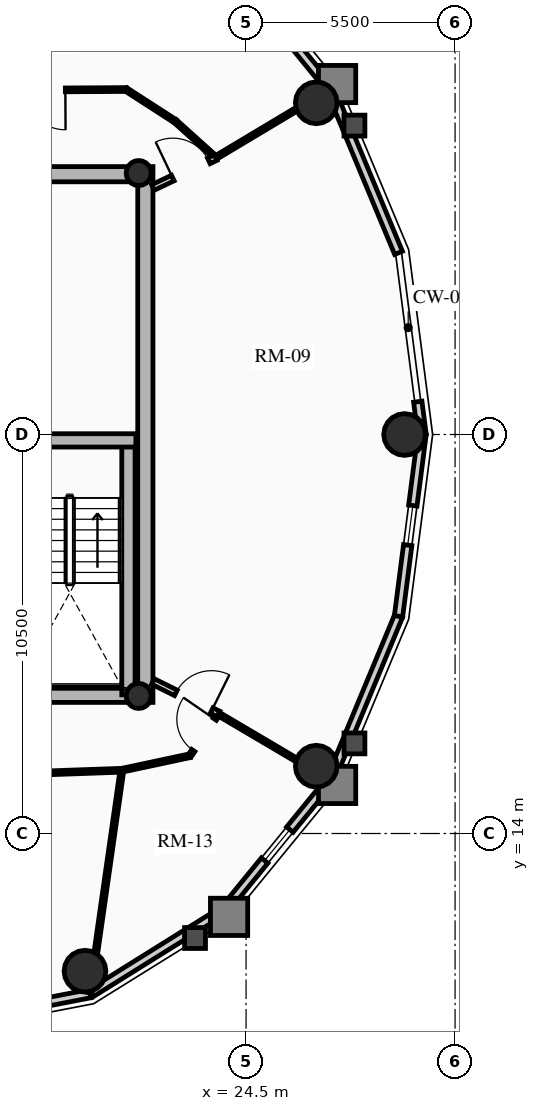
"""IFC4 building model, lengths in metres.
Left out: names, types, materials, properties, quantities, classifications, styles, units other than length and angle.
Written with IfcOpenShell. Run it as: python <this file> out.ifc"""

import sys

from ifc_helpers import new_model, si_unit, direction, frame, frame_2d, origin, origin_2d, place, context, subcontext, project, spatial, rectangle, circle, hollow_circle, extrude, source, transform, mapped, element, fill, save


model = new_model("IFC4")
c1 = context("Model", 3, precision=1e-05, world=origin(), true_north=direction((0.0, 1.0)))
c2 = subcontext(c1, "Body", "Model", "MODEL_VIEW")
j1 = project(units=[si_unit("LENGTHUNIT", "METRE"), si_unit("PLANEANGLEUNIT", "RADIAN")], contexts=[c1])
p1 = place(None, origin())
s1 = spatial("IfcSite", under=j1, at=p1, CompositionType="ELEMENT")
p2 = place(p1, origin())
s2 = spatial("IfcBuilding", under=s1, at=p2, CompositionType="ELEMENT")
p3 = place(p2, frame((0.0, 0.0, 196.66)))
s3 = spatial("IfcBuildingStorey", under=s2, at=p3, CompositionType="ELEMENT", Elevation=196.66)
p4 = place(p3, frame((21.85, 17.45, 0.0), z_axis=(0.0, 0.0, 1.0), x_axis=(0.0, 1.0, 0.0)))
e1 = element("IfcWall", 1, at=p4, inside=s3, PredefinedType="SHEAR", context=c2, shape_type="SweptSolid", body=[
    extrude(rectangle(XDim=14.1, YDim=0.4, at=frame_2d((7.05, 0.0))), origin(), (0.0, 0.0, 1.0), 2.91),
])
p5 = place(p3, frame((11.15, 17.65, 0.0), z_axis=(0.0, 0.0, 1.0), x_axis=(1.0, 0.0, 0.0)))
e2 = element("IfcWall", 2, at=p5, inside=s3, PredefinedType="SHEAR", context=c2, shape_type="SweptSolid", body=[
    extrude(rectangle(XDim=10.7, YDim=0.4, at=frame_2d((5.35, 0.0))), origin(), (0.0, 0.0, 1.0), 2.91),
])
m1 = source(origin(), c2, "Body", "SweptSolid", [
    extrude(rectangle(XDim=1.5, YDim=2.02, at=frame_2d((0.75, 1.01))), frame((0.0, 0.21, 0.0), z_axis=(0.0, -1.0, 0.0), x_axis=(1.0, 0.0, 0.0)), (0.0, 0.0, 1.0), 0.42),
])
p6 = place(p5, frame((5.45, 0.0, 0.0)))
e3 = element("IfcOpeningElement", 3, at=p6, cuts=e2, PredefinedType="OPENING", context=c2, shape_type="MappedRepresentation", body=[
    mapped(m1, transform((0.0, 0.0, 0.0), x_axis=(1.0, 0.0, 0.0), y_axis=(0.0, 1.0, 0.0), z_axis=(0.0, 0.0, 1.0), scale=1.0)),
])
p7 = place(p3, frame((11.15, 31.35, 0.0), z_axis=(0.0, 0.0, 1.0), x_axis=(1.0, 0.0, 0.0)))
e4 = element("IfcWall", 4, at=p7, inside=s3, PredefinedType="SHEAR", context=c2, shape_type="SweptSolid", body=[
    extrude(rectangle(XDim=10.7, YDim=0.4, at=frame_2d((5.35, 0.0))), origin(), (0.0, 0.0, 1.0), 2.91),
])
p8 = place(p7, frame((4.6, 0.0, 0.0)))
e5 = element("IfcOpeningElement", 5, at=p8, cuts=e4, PredefinedType="OPENING", context=c2, shape_type="MappedRepresentation", body=[
    mapped(m1, transform((0.0, 0.0, 0.0), x_axis=(1.0, 0.0, 0.0), y_axis=(0.0, 1.0, 0.0), z_axis=(0.0, 0.0, 1.0), scale=1.0)),
])
p9 = place(p3, frame((21.405, 17.65, 0.0), z_axis=(0.0, 0.0, 1.0), x_axis=(0.0, 1.0, 0.0)))
e6 = element("IfcWall", 6, at=p9, inside=s3, PredefinedType="SHEAR", context=c2, shape_type="SweptSolid", body=[
    extrude(rectangle(XDim=6.695, YDim=0.35, at=frame_2d((3.348, 0.0))), origin(), (0.0, 0.0, 1.0), 2.91),
])
p10 = place(p3, frame((18.315, 24.345, 0.0), z_axis=(0.0, 0.0, 1.0), x_axis=(1.0, 0.0, 0.0)))
e7 = element("IfcWall", 7, at=p10, inside=s3, PredefinedType="SHEAR", context=c2, shape_type="SweptSolid", body=[
    extrude(rectangle(XDim=3.285, YDim=0.35, at=frame_2d((1.643, 0.0))), origin(), (0.0, 0.0, 1.0), 2.91),
])
for number, where, z_axis, x_axis in (
    (8, (21.675, 17.62, 0.0), (0.0, 0.0, 1.0), (1.0, 0.0, 0.0)),
    (9, (21.675, 31.38, 0.0), (0.0, 0.0, 1.0), (1.0, 0.0, 0.0)),
):
    element("IfcColumn", number, at=place(p3, frame(where, z_axis=z_axis, x_axis=x_axis)), inside=s3, PredefinedType="COLUMN", context=c2, shape_type="SweptSolid", body=[
        extrude(hollow_circle(Radius=0.33, WallThickness=0.025, at=origin_2d()), origin(), (0.0, 0.0, 1.0), 2.91),
    ])
for number, where, z_axis, x_axis in (
    (10, (28.672, 24.5, 0.0), (0.0, 0.0, 1.0), (1.0, 0.0, 0.0)),
    (11, (26.347, 33.229, 0.0), (0.0, 0.0, 1.0), (1.0, 0.0, 0.0)),
    (12, (20.261, 10.377, 0.0), (0.0, 0.0, 1.0), (1.0, 0.0, 0.0)),
    (13, (26.347, 15.771, 0.0), (0.0, 0.0, 1.0), (1.0, 0.0, 0.0)),
):
    element("IfcColumn", number, at=place(p3, frame(where, z_axis=z_axis, x_axis=x_axis)), inside=s3, PredefinedType="USERDEFINED", context=c2, shape_type="SweptSolid", body=[
        extrude(circle(Radius=0.55, at=origin_2d()), origin(), (0.0, 0.0, 1.0), 2.91),
    ])
p11 = place(p3, frame((29.018, 25.363, 0.0), z_axis=(0.0, 0.0, 1.0), x_axis=(0.128247365719, -0.991742211054, 0.0)))
e14 = element("IfcWall", 14, at=p11, inside=s3, PredefinedType="SOLIDWALL", context=c2, shape_type="SweptSolid", body=[
    extrude(rectangle(XDim=0.87, YDim=0.22, at=frame_2d((0.435, 0.0))), origin(), (0.0, 0.0, 1.0), 2.322),
])
p12 = place(p3, frame((26.718, 33.593, 0.0), z_axis=(0.0, 0.0, 1.0), x_axis=(0.384036305194, -0.923317993052, 0.0)))
e15 = element("IfcWall", 15, at=p12, inside=s3, PredefinedType="SOLIDWALL", context=c2, shape_type="SweptSolid", body=[
    extrude(rectangle(XDim=4.671, YDim=0.22, at=frame_2d((2.335, 0.0))), origin(), (0.0, 0.0, 1.0), 2.322),
])
p13 = place(p3, frame((23.924, 37.015, 0.0), z_axis=(0.0, 0.0, 1.0), x_axis=(0.632467166636, -0.774587169483, 0.0)))
e16 = element("IfcWall", 16, at=p13, inside=s3, PredefinedType="SOLIDWALL", context=c2, shape_type="SweptSolid", body=[
    extrude(rectangle(XDim=4.418, YDim=0.22, at=frame_2d((2.209, 0.0))), origin(), (0.0, 0.0, 1.0), 2.322),
])
m2 = source(origin(), c2, "Body", "SweptSolid", [
    extrude(rectangle(XDim=1.05, YDim=1.3, at=frame_2d((0.525, 0.65))), frame((0.0, 0.12, 0.0), z_axis=(0.0, -1.0, 0.0), x_axis=(1.0, 0.0, 0.0)), (0.0, 0.0, 1.0), 0.24),
])
p14 = place(p13, frame((1.684, 0.0, 0.65)))
e17 = element("IfcOpeningElement", 17, at=p14, cuts=e16, PredefinedType="OPENING", context=c2, shape_type="MappedRepresentation", body=[
    mapped(m2, transform((0.0, 0.0, 0.0), x_axis=(1.0, 0.0, 0.0), y_axis=(0.0, 1.0, 0.0), z_axis=(0.0, 0.0, 1.0), scale=1.0)),
])
p15 = place(p3, frame((20.403, 9.787, 0.0), z_axis=(0.0, 0.0, 1.0), x_axis=(-0.981700307484, -0.190432419211, 0.0)))
e18 = element("IfcWall", 18, at=p15, inside=s3, PredefinedType="SOLIDWALL", context=c2, shape_type="SweptSolid", body=[
    extrude(rectangle(XDim=3.976, YDim=0.22, at=frame_2d((1.988, 0.0))), origin(), (0.0, 0.0, 1.0), 2.322),
])
p16 = place(p15, frame((1.463, 0.0, 0.65)))
e19 = element("IfcOpeningElement", 19, at=p16, cuts=e18, PredefinedType="OPENING", context=c2, shape_type="MappedRepresentation", body=[
    mapped(m2, transform((0.0, 0.0, 0.0), x_axis=(1.0, 0.0, 0.0), y_axis=(0.0, 1.0, 0.0), z_axis=(0.0, 0.0, 1.0), scale=1.0)),
])
p17 = place(p3, frame((23.924, 11.985, 0.0), z_axis=(0.0, 0.0, 1.0), x_axis=(-0.848318713376, -0.529485939886, 0.0)))
e20 = element("IfcWall", 20, at=p17, inside=s3, PredefinedType="SOLIDWALL", context=c2, shape_type="SweptSolid", body=[
    extrude(rectangle(XDim=4.15, YDim=0.22, at=frame_2d((2.075, 0.0))), origin(), (0.0, 0.0, 1.0), 2.322),
])
p18 = place(p3, frame((26.718, 15.407, 0.0), z_axis=(0.0, 0.0, 1.0), x_axis=(-0.632467166636, -0.774587169483, 0.0)))
e21 = element("IfcWall", 21, at=p18, inside=s3, PredefinedType="SOLIDWALL", context=c2, shape_type="SweptSolid", body=[
    extrude(rectangle(XDim=4.418, YDim=0.22, at=frame_2d((2.209, 0.0))), origin(), (0.0, 0.0, 1.0), 2.322),
])
p19 = place(p18, frame((1.684, 0.0, 0.65)))
e22 = element("IfcOpeningElement", 22, at=p19, cuts=e21, PredefinedType="OPENING", context=c2, shape_type="MappedRepresentation", body=[
    mapped(m2, transform((0.0, 0.0, 0.0), x_axis=(1.0, 0.0, 0.0), y_axis=(0.0, 1.0, 0.0), z_axis=(0.0, 0.0, 1.0), scale=1.0)),
])
p20 = place(p3, frame((28.512, 19.719, 0.0), z_axis=(0.0, 0.0, 1.0), x_axis=(-0.384036305194, -0.923317993052, 0.0)))
e23 = element("IfcWall", 23, at=p20, inside=s3, PredefinedType="SOLIDWALL", context=c2, shape_type="SweptSolid", body=[
    extrude(rectangle(XDim=4.671, YDim=0.22, at=frame_2d((2.335, 0.0))), origin(), (0.0, 0.0, 1.0), 2.322),
])
p21 = place(p3, frame((29.13, 24.5, 0.0), z_axis=(0.0, 0.0, 1.0), x_axis=(-0.128241318541, -0.991742993027, 0.0)))
e24 = element("IfcWall", 24, at=p21, inside=s3, PredefinedType="SOLIDWALL", context=c2, shape_type="SweptSolid", body=[
    extrude(rectangle(XDim=4.82, YDim=0.22, at=frame_2d((2.41, 0.0))), origin(), (0.0, 0.0, 1.0), 2.322),
])
p22 = place(p21, frame((1.885, 0.0, 0.65)))
e25 = element("IfcOpeningElement", 25, at=p22, cuts=e24, PredefinedType="OPENING", context=c2, shape_type="MappedRepresentation", body=[
    mapped(m2, transform((0.0, 0.0, 0.0), x_axis=(1.0, 0.0, 0.0), y_axis=(0.0, 1.0, 0.0), z_axis=(0.0, 0.0, 1.0), scale=1.0)),
])
p23 = place(p3, frame((23.701, 31.786, 0.0), z_axis=(0.0, 0.0, 1.0), x_axis=(-0.743742806382, 0.668465883913, 0.0)))
e26 = element("IfcWall", 26, at=p23, inside=s3, PredefinedType="MOVABLE", context=c2, shape_type="SweptSolid", body=[
    extrude(rectangle(XDim=1.434, YDim=0.1, at=frame_2d((0.717, 0.0))), origin(), (0.0, 0.0, 1.0), 2.322),
])
p24 = place(p3, frame((22.635, 32.744, 0.0), z_axis=(0.0, 0.0, 1.0), x_axis=(-0.840119270642, 0.542401706391, 0.0)))
e27 = element("IfcWall", 27, at=p24, inside=s3, PredefinedType="MOVABLE", context=c2, shape_type="SweptSolid", body=[
    extrude(rectangle(XDim=1.538, YDim=0.1, at=frame_2d((0.769, 0.0))), origin(), (0.0, 0.0, 1.0), 2.255),
])
p25 = place(p3, frame((21.344, 33.578, 0.0), z_axis=(0.0, 0.0, 1.0), x_axis=(-0.999984243152, -0.005613684, 0.0)))
e28 = element("IfcWall", 28, at=p25, inside=s3, PredefinedType="MOVABLE", context=c2, shape_type="SweptSolid", body=[
    extrude(rectangle(XDim=3.262, YDim=0.1, at=frame_2d((1.631, 0.0))), origin(), (0.0, 0.0, 1.0), 2.322),
])
m3 = source(origin(), c2, "Body", "SweptSolid", [
    extrude(rectangle(XDim=1.05, YDim=2.015, at=frame_2d((0.525, 1.007))), frame((0.0, 0.06, 0.0), z_axis=(0.0, -1.0, 0.0), x_axis=(1.0, 0.0, 0.0)), (0.0, 0.0, 1.0), 0.12),
])
p26 = place(p25, frame((1.599, 0.0, 0.0)))
e29 = element("IfcOpeningElement", 29, at=p26, cuts=e28, PredefinedType="OPENING", context=c2, shape_type="MappedRepresentation", body=[
    mapped(m3, transform((0.0, 0.0, 0.0), x_axis=(1.0, 0.0, 0.0), y_axis=(0.0, 1.0, 0.0), z_axis=(0.0, 0.0, 1.0), scale=1.0)),
])
p27 = place(p3, frame((14.845, 15.441, 0.0), z_axis=(0.0, 0.0, 1.0), x_axis=(0.99938794868, 0.034981824334, 0.0)))
e30 = element("IfcWall", 30, at=p27, inside=s3, PredefinedType="MOVABLE", context=c2, shape_type="SweptSolid", body=[
    extrude(rectangle(XDim=6.393, YDim=0.1, at=frame_2d((3.196, 0.0))), origin(), (0.0, 0.0, 1.0), 2.255),
])
p28 = place(p3, frame((21.234, 15.664, 0.0), z_axis=(0.0, 0.0, 1.0), x_axis=(0.977931581182, 0.208925399431, 0.0)))
e31 = element("IfcWall", 31, at=p28, inside=s3, PredefinedType="MOVABLE", context=c2, shape_type="SweptSolid", body=[
    extrude(rectangle(XDim=1.823, YDim=0.1, at=frame_2d((0.912, 0.0))), origin(), (0.0, 0.0, 1.0), 2.255),
])
p29 = place(p3, frame((23.017, 16.045, 0.0), z_axis=(0.0, 0.0, 1.0), x_axis=(0.566660656138, 0.823951273308, 0.0)))
e32 = element("IfcWall", 32, at=p29, inside=s3, PredefinedType="MOVABLE", context=c2, shape_type="SweptSolid", body=[
    extrude(rectangle(XDim=1.336, YDim=0.1, at=frame_2d((0.668, 0.0))), origin(), (0.0, 0.0, 1.0), 2.322),
])
m4 = source(origin(), c2, "Body", "SweptSolid", [
    extrude(rectangle(XDim=1.0, YDim=2.015, at=frame_2d((0.5, 1.007))), frame((0.0, 0.06, 0.0), z_axis=(0.0, -1.0, 0.0), x_axis=(1.0, 0.0, 0.0)), (0.0, 0.0, 1.0), 0.12),
])
p30 = place(p29, frame((0.168, 0.0, 0.0)))
e33 = element("IfcOpeningElement", 33, at=p30, cuts=e32, PredefinedType="OPENING", context=c2, shape_type="MappedRepresentation", body=[
    mapped(m4, transform((0.0, 0.0, 0.0), x_axis=(1.0, 0.0, 0.0), y_axis=(0.0, 1.0, 0.0), z_axis=(0.0, 0.0, 1.0), scale=1.0)),
])
p31 = place(p3, frame((23.701, 31.786, 0.0), z_axis=(0.0, 0.0, 1.0), x_axis=(0.858059206709, 0.513550774298, 0.0)))
e34 = element("IfcWall", 34, at=p31, inside=s3, PredefinedType="MOVABLE", context=c2, shape_type="SweptSolid", body=[
    extrude(rectangle(XDim=3.497, YDim=0.1, at=frame_2d((1.748, 0.0))), origin(), (0.0, 0.0, 1.0), 2.322),
])
p32 = place(p3, frame((21.234, 15.664, 0.0), z_axis=(0.0, 0.0, 1.0), x_axis=(-0.141467563045, -0.989942891588, 0.0)))
e35 = element("IfcWall", 35, at=p32, inside=s3, PredefinedType="MOVABLE", context=c2, shape_type="SweptSolid", body=[
    extrude(rectangle(XDim=5.918, YDim=0.1, at=frame_2d((2.959, 0.0))), origin(), (0.0, 0.0, 1.0), 2.322),
])
p33 = place(p3, frame((23.774, 17.146, 0.0), z_axis=(0.0, 0.0, 1.0), x_axis=(0.861296601099, -0.508102514198, 0.0)))
e36 = element("IfcWall", 36, at=p33, inside=s3, PredefinedType="MOVABLE", context=c2, shape_type="SweptSolid", body=[
    extrude(rectangle(XDim=3.399, YDim=0.1, at=frame_2d((1.7, 0.0))), origin(), (0.0, 0.0, 1.0), 2.322),
])
p34 = place(p3, frame((22.05, 31.0, 0.0), z_axis=(0.0, 0.0, 1.0), x_axis=(0.903013459407, 0.429612257891, 0.0)))
e37 = element("IfcWall", 37, at=p34, inside=s3, PredefinedType="PARTITIONING", context=c2, shape_type="SweptSolid", body=[
    extrude(rectangle(XDim=1.829, YDim=0.16, at=frame_2d((0.914, 0.0))), origin(), (0.0, 0.0, 1.0), 2.255),
])
m5 = source(origin(), c2, "Body", "SweptSolid", [
    extrude(rectangle(XDim=1.05, YDim=2.015, at=frame_2d((0.525, 1.007))), frame((0.0, 0.09, 0.0), z_axis=(0.0, -1.0, 0.0), x_axis=(1.0, 0.0, 0.0)), (0.0, 0.0, 1.0), 0.18),
])
p35 = place(p34, frame((0.579, 0.0, 0.0)))
e38 = element("IfcOpeningElement", 38, at=p35, cuts=e37, PredefinedType="OPENING", context=c2, shape_type="MappedRepresentation", body=[
    mapped(m5, transform((0.0, 0.0, 0.0), x_axis=(1.0, 0.0, 0.0), y_axis=(0.0, 1.0, 0.0), z_axis=(0.0, 0.0, 1.0), scale=1.0)),
])
p36 = place(p3, frame((22.05, 18.0, 0.0), z_axis=(0.0, 0.0, 1.0), x_axis=(0.896045848613, -0.443961526692, 0.0)))
e39 = element("IfcWall", 39, at=p36, inside=s3, PredefinedType="PARTITIONING", context=c2, shape_type="SweptSolid", body=[
    extrude(rectangle(XDim=1.924, YDim=0.16, at=frame_2d((0.962, 0.0))), origin(), (0.0, 0.0, 1.0), 2.255),
])
p37 = place(p36, frame((0.674, 0.0, 0.0)))
e40 = element("IfcOpeningElement", 40, at=p37, cuts=e39, PredefinedType="OPENING", context=c2, shape_type="MappedRepresentation", body=[
    mapped(m5, transform((0.0, 0.0, 0.0), x_axis=(1.0, 0.0, 0.0), y_axis=(0.0, 1.0, 0.0), z_axis=(0.0, 0.0, 1.0), scale=1.0)),
])
m6 = source(origin(), c2, "Body", "SweptSolid", [
    extrude(rectangle(XDim=1.05, YDim=1.3, at=frame_2d((0.525, 0.65))), frame((0.0, 0.03, 0.0), z_axis=(0.0, -1.0, 0.0), x_axis=(1.0, 0.0, 0.0)), (0.0, 0.0, 1.0), 0.06),
])
p38 = place(p19, origin())
e41 = element("IfcWindow", 41, at=p38, inside=s3, PartitioningType="SINGLE_PANEL", PredefinedType="WINDOW", context=c2, shape_type="MappedRepresentation", body=[
    mapped(m6, transform((0.0, 0.0, 0.0), x_axis=(1.0, 0.0, 0.0), y_axis=(0.0, 1.0, 0.0), z_axis=(0.0, 0.0, 1.0), scale=1.0)),
])
fill(e22, e41)
p39 = place(p22, origin())
e42 = element("IfcWindow", 42, at=p39, inside=s3, PartitioningType="SINGLE_PANEL", PredefinedType="WINDOW", context=c2, shape_type="MappedRepresentation", body=[
    mapped(m6, transform((0.0, 0.0, 0.0), x_axis=(1.0, 0.0, 0.0), y_axis=(0.0, 1.0, 0.0), z_axis=(0.0, 0.0, 1.0), scale=1.0)),
])
fill(e25, e42)
m7 = source(origin(), c2, "Body", "SweptSolid", [
    extrude(rectangle(XDim=1.05, YDim=2.015, at=frame_2d((0.525, 1.007))), frame((0.0, 0.025, 0.0), z_axis=(0.0, -1.0, 0.0), x_axis=(1.0, 0.0, 0.0)), (0.0, 0.0, 1.0), 0.05),
])
p40 = place(p35, origin())
e43 = element("IfcDoor", 43, at=p40, inside=s3, OperationType="SINGLE_SWING_LEFT", PredefinedType="DOOR", context=c2, shape_type="MappedRepresentation", body=[
    mapped(m7, transform((0.0, 0.0, 0.0), x_axis=(1.0, 0.0, 0.0), y_axis=(0.0, 1.0, 0.0), z_axis=(0.0, 0.0, 1.0), scale=1.0)),
])
fill(e38, e43)
p41 = place(p37, origin())
e44 = element("IfcDoor", 44, at=p41, inside=s3, OperationType="SINGLE_SWING_RIGHT", PredefinedType="DOOR", context=c2, shape_type="MappedRepresentation", body=[
    mapped(m7, transform((0.0, 0.0, 0.0), x_axis=(1.0, 0.0, 0.0), y_axis=(0.0, 1.0, 0.0), z_axis=(0.0, 0.0, 1.0), scale=1.0)),
])
fill(e40, e44)
p42 = place(p26, origin())
e45 = element("IfcDoor", 45, at=p42, inside=s3, OperationType="SINGLE_SWING_LEFT", PredefinedType="DOOR", context=c2, shape_type="MappedRepresentation", body=[
    mapped(m7, transform((0.0, 0.0, 0.0), x_axis=(1.0, 0.0, 0.0), y_axis=(0.0, 1.0, 0.0), z_axis=(0.0, 0.0, 1.0), scale=1.0)),
])
fill(e29, e45)
m8 = source(origin(), c2, "Body", "SweptSolid", [
    extrude(rectangle(XDim=1.0, YDim=2.015, at=frame_2d((0.5, 1.007))), frame((0.0, 0.025, 0.0), z_axis=(0.0, -1.0, 0.0), x_axis=(1.0, 0.0, 0.0)), (0.0, 0.0, 1.0), 0.05),
])
p43 = place(p30, origin())
e46 = element("IfcDoor", 46, at=p43, inside=s3, OperationType="SINGLE_SWING_RIGHT", PredefinedType="DOOR", context=c2, shape_type="MappedRepresentation", body=[
    mapped(m8, transform((0.0, 0.0, 0.0), x_axis=(1.0, 0.0, 0.0), y_axis=(0.0, 1.0, 0.0), z_axis=(0.0, 0.0, 1.0), scale=1.0)),
])
fill(e33, e46)
save(model, sys.argv[1])
